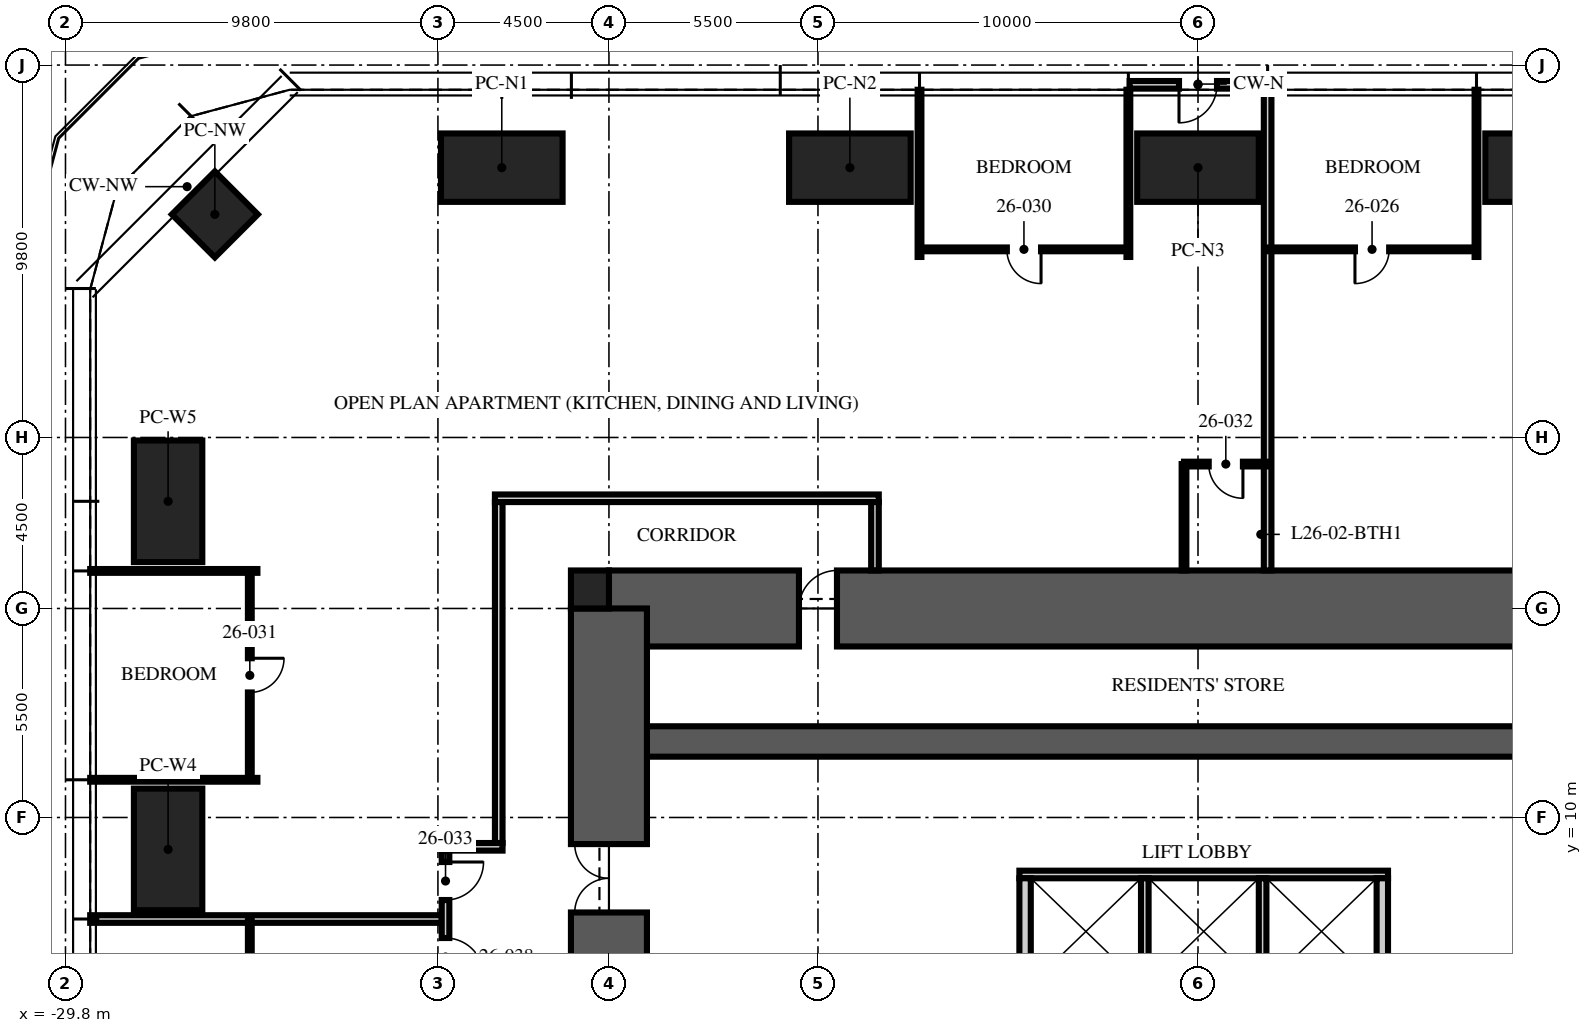
"""IFC4 building model, lengths in metres.
Left out: names, types, materials, properties, quantities, classifications, styles, units other than length and angle.
Written with IfcOpenShell. Run it as: python <this file> out.ifc"""

import sys

from ifc_helpers import new_model, si_unit, direction, frame, frame_2d, origin, origin_2d, place, context, subcontext, project, spatial, rectangle, hollow_rectangle, extrude, element, fill, save


model = new_model("IFC4")
c1 = context("Model", 3, precision=1e-05, world=origin(), true_north=direction((0.0, 1.0)))
c2 = subcontext(c1, "Body", "Model", "MODEL_VIEW")
j1 = project(units=[si_unit("LENGTHUNIT", "METRE"), si_unit("PLANEANGLEUNIT", "RADIAN")], contexts=[c1])
p1 = place(None, origin())
s1 = spatial("IfcSite", under=j1, at=p1, CompositionType="ELEMENT")
p2 = place(p1, origin())
s2 = spatial("IfcBuilding", under=s1, at=p2, CompositionType="ELEMENT")
p3 = place(p2, frame((0.0, 0.0, 107.25)))
s3 = spatial("IfcBuildingStorey", under=s2, at=p3, CompositionType="ELEMENT", Elevation=107.25)
p4 = place(p3, frame((-15.5, 15.5, -0.25), z_axis=(0.0, 0.0, 1.0), x_axis=(1.0, 0.0, 0.0)))
e1 = element("IfcWall", 1, at=p4, inside=s3, PredefinedType="SHEAR", context=c2, shape_type="SweptSolid", body=[
    extrude(rectangle(XDim=31.0, YDim=2.0, at=frame_2d((15.5, 0.0))), origin(), (0.0, 0.0, 1.0), 3.75),
])
p5 = place(p4, frame((5.0, 0.0, 0.25)))
e2 = element("IfcOpeningElement", 2, at=p5, cuts=e1, PredefinedType="OPENING", context=c2, shape_type="SweptSolid", body=[
    extrude(rectangle(XDim=1.0, YDim=2.1, at=frame_2d((0.5, 1.05))), frame((0.0, 1.01, 0.0), z_axis=(0.0, -1.0, 0.0), x_axis=(1.0, 0.0, 0.0)), (0.0, 0.0, 1.0), 2.02),
])
p6 = place(p3, frame((-15.5, 12.0, -0.25), z_axis=(0.0, 0.0, 1.0), x_axis=(1.0, 0.0, 0.0)))
e3 = element("IfcWall", 3, at=p6, inside=s3, PredefinedType="SHEAR", context=c2, shape_type="SweptSolid", body=[
    extrude(rectangle(XDim=31.0, YDim=0.8, at=frame_2d((15.5, 0.0))), origin(), (0.0, 0.0, 1.0), 3.75),
])
p7 = place(p3, frame((-15.5, -15.5, -0.25), z_axis=(0.0, 0.0, 1.0), x_axis=(0.0, 1.0, 0.0)))
e4 = element("IfcWall", 4, at=p7, inside=s3, PredefinedType="SHEAR", context=c2, shape_type="SweptSolid", body=[
    extrude(rectangle(XDim=31.0, YDim=2.0, at=frame_2d((15.5, 0.0))), origin(), (0.0, 0.0, 1.0), 3.75),
])
p8 = place(p7, frame((6.5, 0.0, 0.25)))
e5 = element("IfcOpeningElement", 5, at=p8, cuts=e4, PredefinedType="OPENING", context=c2, shape_type="SweptSolid", body=[
    extrude(rectangle(XDim=1.2, YDim=2.1, at=frame_2d((0.6, 1.05))), frame((0.0, 1.01, 0.0), z_axis=(0.0, -1.0, 0.0), x_axis=(1.0, 0.0, 0.0)), (0.0, 0.0, 1.0), 2.02),
])
p9 = place(p7, frame((23.0, 0.0, 0.25)))
e6 = element("IfcOpeningElement", 6, at=p9, cuts=e4, PredefinedType="OPENING", context=c2, shape_type="SweptSolid", body=[
    extrude(rectangle(XDim=1.8, YDim=2.1, at=frame_2d((0.9, 1.05))), frame((0.0, 1.01, 0.0), z_axis=(0.0, -1.0, 0.0), x_axis=(1.0, 0.0, 0.0)), (0.0, 0.0, 1.0), 2.02),
])
p10 = place(p3, frame((-16.0, 16.0, -0.25), z_axis=(0.0, 0.0, 1.0), x_axis=(1.0, 0.0, 0.0)))
e7 = element("IfcColumn", 7, at=p10, inside=s3, PredefinedType="COLUMN", context=c2, shape_type="SweptSolid", body=[
    extrude(rectangle(XDim=1.0, YDim=1.0, at=origin_2d()), origin(), (0.0, 0.0, 1.0), 3.75),
])
p11 = place(p3, frame((-18.32, 27.1, 0.08), z_axis=(0.0, 0.0, 1.0), x_axis=(1.0, 0.0, 0.0)))
e8 = element("IfcColumn", 8, at=p11, inside=s3, PredefinedType="COLUMN", context=c2, shape_type="SweptSolid", body=[
    extrude(hollow_rectangle(XDim=3.2, YDim=1.8, WallThickness=0.2, at=origin_2d()), origin(), (0.0, 0.0, 1.0), 3.67),
])
p12 = place(p3, frame((-9.16, 27.1, -0.07), z_axis=(0.0, 0.0, 1.0), x_axis=(1.0, 0.0, 0.0)))
e9 = element("IfcColumn", 9, at=p12, inside=s3, PredefinedType="COLUMN", context=c2, shape_type="SweptSolid", body=[
    extrude(hollow_rectangle(XDim=3.2, YDim=1.8, WallThickness=0.2, at=origin_2d()), origin(), (0.0, 0.0, 1.0), 3.82),
])
p13 = place(p3, frame((0.0, 27.1, -0.23), z_axis=(0.0, 0.0, 1.0), x_axis=(1.0, 0.0, 0.0)))
e10 = element("IfcColumn", 10, at=p13, inside=s3, PredefinedType="COLUMN", context=c2, shape_type="SweptSolid", body=[
    extrude(hollow_rectangle(XDim=3.2, YDim=1.8, WallThickness=0.2, at=origin_2d()), origin(), (0.0, 0.0, 1.0), 3.98),
])
for number, where, z_axis, x_axis in (
    (11, (9.16, 27.1, -0.07), (0.0, 0.0, 1.0), (1.0, 0.0, 0.0)),
    (12, (-27.1, 9.16, -0.07), (0.0, 0.0, 1.0), (0.0, 1.0, 0.0)),
):
    element("IfcColumn", number, at=place(p3, frame(where, z_axis=z_axis, x_axis=x_axis)), inside=s3, PredefinedType="COLUMN", context=c2, shape_type="SweptSolid", body=[
        extrude(hollow_rectangle(XDim=3.2, YDim=1.8, WallThickness=0.2, at=origin_2d()), origin(), (0.0, 0.0, 1.0), 3.82),
    ])
p14 = place(p3, frame((-27.1, 18.32, 0.08), z_axis=(0.0, 0.0, 1.0), x_axis=(0.0, 1.0, 0.0)))
e13 = element("IfcColumn", 13, at=p14, inside=s3, PredefinedType="COLUMN", context=c2, shape_type="SweptSolid", body=[
    extrude(hollow_rectangle(XDim=3.2, YDim=1.8, WallThickness=0.2, at=origin_2d()), origin(), (0.0, 0.0, 1.0), 3.67),
])
p15 = place(p3, frame((-25.87, 25.87, -0.19), z_axis=(0.0, 0.0, 1.0), x_axis=(0.707106781187, 0.707106781187, 0.0)))
e14 = element("IfcColumn", 14, at=p15, inside=s3, PredefinedType="COLUMN", context=c2, shape_type="SweptSolid", body=[
    extrude(hollow_rectangle(XDim=1.6, YDim=1.6, WallThickness=0.1, at=origin_2d()), origin(), (0.0, 0.0, 1.0), 3.94),
])
p16 = place(p3, frame((1.8, 29.28, 0.0), z_axis=(0.0, 0.0, 1.0), x_axis=(-1.0, 0.0, 0.0)))
e15 = element("IfcWall", 15, at=p16, inside=s3, PredefinedType="ELEMENTEDWALL", context=c2, shape_type="SweptSolid", body=[
    extrude(rectangle(XDim=3.599, YDim=0.2, at=frame_2d((1.8, 0.0))), origin(), (0.0, 0.0, 1.0), 3.75),
])
p17 = place(p16, frame((1.3, 0.0, 0.0)))
e16 = element("IfcOpeningElement", 16, at=p17, cuts=e15, PredefinedType="OPENING", context=c2, shape_type="SweptSolid", body=[
    extrude(rectangle(XDim=1.0, YDim=2.4, at=frame_2d((0.5, 1.2))), frame((0.0, 0.11, 0.0), z_axis=(0.0, -1.0, 0.0), x_axis=(1.0, 0.0, 0.0)), (0.0, 0.0, 1.0), 0.22),
])
p18 = place(p3, frame((-4.7, 8.5, 0.0), z_axis=(0.0, 0.0, 1.0), x_axis=(1.0, 0.0, 0.0)))
e17 = element("IfcWall", 17, at=p18, inside=s3, PredefinedType="PARTITIONING", context=c2, shape_type="SweptSolid", body=[
    extrude(rectangle(XDim=9.7, YDim=0.2, at=frame_2d((4.85, 0.0))), origin(), (0.0, 0.0, 1.0), 3.5),
])
for number, where, z_axis, x_axis in (
    (18, (-4.55, 5.6, 0.0), (0.0, 0.0, 1.0), (0.0, 1.0, 0.0)),
    (19, (4.85, 5.6, 0.0), (0.0, 0.0, 1.0), (0.0, 1.0, 0.0)),
):
    element("IfcWall", number, at=place(p3, frame(where, z_axis=z_axis, x_axis=x_axis)), inside=s3, PredefinedType="PARTITIONING", context=c2, shape_type="SweptSolid", body=[
        extrude(rectangle(XDim=2.8, YDim=0.3, at=frame_2d((1.4, 0.0))), origin(), (0.0, 0.0, 1.0), 3.5),
    ])
for number, where, z_axis, x_axis in (
    (20, (-1.4, 5.6, 0.0), (0.0, 0.0, 1.0), (0.0, 1.0, 0.0)),
    (21, (1.7, 5.6, 0.0), (0.0, 0.0, 1.0), (0.0, 1.0, 0.0)),
):
    element("IfcWall", number, at=place(p3, frame(where, z_axis=z_axis, x_axis=x_axis)), inside=s3, PredefinedType="PARTITIONING", context=c2, shape_type="SweptSolid", body=[
        extrude(rectangle(XDim=2.8, YDim=0.2, at=frame_2d((1.4, 0.0))), origin(), (0.0, 0.0, 1.0), 3.5),
    ])
p19 = place(p3, frame((-18.5, 18.4, 0.0), z_axis=(0.0, 0.0, 1.0), x_axis=(1.0, 0.0, 0.0)))
e22 = element("IfcWall", 22, at=p19, inside=s3, PredefinedType="PARTITIONING", context=c2, shape_type="SweptSolid", body=[
    extrude(rectangle(XDim=10.1, YDim=0.2, at=frame_2d((5.05, 0.0))), origin(), (0.0, 0.0, 1.0), 2.3),
])
p20 = place(p3, frame((-8.5, 18.3, 0.0), z_axis=(0.0, 0.0, 1.0), x_axis=(0.0, -1.0, 0.0)))
e23 = element("IfcWall", 23, at=p20, inside=s3, PredefinedType="PARTITIONING", context=c2, shape_type="SweptSolid", body=[
    extrude(rectangle(XDim=1.8, YDim=0.2, at=frame_2d((0.9, 0.0))), origin(), (0.0, 0.0, 1.0), 3.5),
])
p21 = place(p3, frame((7.328, 24.75, 0.0), z_axis=(0.0, 0.0, 1.0), x_axis=(0.0, 1.0, 0.0)))
e24 = element("IfcWall", 24, at=p21, inside=s3, PredefinedType="PARTITIONING", context=c2, shape_type="SweptSolid", body=[
    extrude(rectangle(XDim=4.4, YDim=0.1, at=frame_2d((2.2, 0.0))), origin(), (0.0, 0.0, 1.0), 2.81),
])
p22 = place(p3, frame((1.832, 16.5, 0.0), z_axis=(0.0, 0.0, 1.0), x_axis=(0.0, 1.0, 0.0)))
e25 = element("IfcWall", 25, at=p22, inside=s3, PredefinedType="PARTITIONING", context=c2, shape_type="SweptSolid", body=[
    extrude(rectangle(XDim=12.65, YDim=0.2, at=frame_2d((6.325, 0.0))), origin(), (0.0, 0.0, 1.0), 2.81),
])
for number, where, z_axis, x_axis in (
    (26, (-1.832, 24.75, 0.0), (0.0, 0.0, 1.0), (0.0, 1.0, 0.0)),
    (27, (-7.328, 24.75, 0.0), (0.0, 0.0, 1.0), (0.0, 1.0, 0.0)),
    (28, (-24.75, 16.488, 0.0), (0.0, 0.0, 1.0), (-1.0, 0.0, 0.0)),
    (29, (-24.75, 10.992, 0.0), (0.0, 0.0, 1.0), (-1.0, 0.0, 0.0)),
):
    element("IfcWall", number, at=place(p3, frame(where, z_axis=z_axis, x_axis=x_axis)), inside=s3, PredefinedType="PARTITIONING", context=c2, shape_type="SweptSolid", body=[
        extrude(rectangle(XDim=4.4, YDim=0.1, at=frame_2d((2.2, 0.0))), origin(), (0.0, 0.0, 1.0), 2.81),
    ])
p23 = place(p3, frame((-19.9, 7.328, 0.0), z_axis=(0.0, 0.0, 1.0), x_axis=(-1.0, 0.0, 0.0)))
e30 = element("IfcWall", 30, at=p23, inside=s3, PredefinedType="PARTITIONING", context=c2, shape_type="SweptSolid", body=[
    extrude(rectangle(XDim=9.25, YDim=0.2, at=frame_2d((4.625, 0.0))), origin(), (0.0, 0.0, 1.0), 2.81),
])
p24 = place(p3, frame((7.328, 24.95, 0.0), z_axis=(0.0, 0.0, 1.0), x_axis=(-1.0, 0.0, 0.0)))
e31 = element("IfcWall", 31, at=p24, inside=s3, PredefinedType="PARTITIONING", context=c2, shape_type="SweptSolid", body=[
    extrude(rectangle(XDim=5.496, YDim=0.1, at=frame_2d((2.748, 0.0))), origin(), (0.0, 0.0, 1.0), 2.81),
])
p25 = place(p24, frame((2.298, 0.0, 0.0)))
e32 = element("IfcOpeningElement", 32, at=p25, cuts=e31, PredefinedType="OPENING", context=c2, shape_type="SweptSolid", body=[
    extrude(rectangle(XDim=0.9, YDim=2.1, at=frame_2d((0.45, 1.05))), frame((0.0, 0.06, 0.0), z_axis=(0.0, -1.0, 0.0), x_axis=(1.0, 0.0, 0.0)), (0.0, 0.0, 1.0), 0.12),
])
p26 = place(p3, frame((-1.832, 24.95, 0.0), z_axis=(0.0, 0.0, 1.0), x_axis=(-1.0, 0.0, 0.0)))
e33 = element("IfcWall", 33, at=p26, inside=s3, PredefinedType="PARTITIONING", context=c2, shape_type="SweptSolid", body=[
    extrude(rectangle(XDim=5.496, YDim=0.1, at=frame_2d((2.748, 0.0))), origin(), (0.0, 0.0, 1.0), 2.81),
])
p27 = place(p26, frame((2.298, 0.0, 0.0)))
e34 = element("IfcOpeningElement", 34, at=p27, cuts=e33, PredefinedType="OPENING", context=c2, shape_type="SweptSolid", body=[
    extrude(rectangle(XDim=0.9, YDim=2.1, at=frame_2d((0.45, 1.05))), frame((0.0, 0.06, 0.0), z_axis=(0.0, -1.0, 0.0), x_axis=(1.0, 0.0, 0.0)), (0.0, 0.0, 1.0), 0.12),
])
p28 = place(p3, frame((-24.95, 16.488, 0.0), z_axis=(0.0, 0.0, 1.0), x_axis=(0.0, -1.0, 0.0)))
e35 = element("IfcWall", 35, at=p28, inside=s3, PredefinedType="PARTITIONING", context=c2, shape_type="SweptSolid", body=[
    extrude(rectangle(XDim=5.496, YDim=0.1, at=frame_2d((2.748, 0.0))), origin(), (0.0, 0.0, 1.0), 2.81),
])
p29 = place(p28, frame((2.298, 0.0, 0.0)))
e36 = element("IfcOpeningElement", 36, at=p29, cuts=e35, PredefinedType="OPENING", context=c2, shape_type="SweptSolid", body=[
    extrude(rectangle(XDim=0.9, YDim=2.1, at=frame_2d((0.45, 1.05))), frame((0.0, 0.06, 0.0), z_axis=(0.0, -1.0, 0.0), x_axis=(1.0, 0.0, 0.0)), (0.0, 0.0, 1.0), 0.12),
])
p30 = place(p3, frame((1.832, 19.3, 0.0), z_axis=(0.0, 0.0, 1.0), x_axis=(-1.0, 0.0, 0.0)))
e37 = element("IfcWall", 37, at=p30, inside=s3, PredefinedType="PARTITIONING", context=c2, shape_type="SweptSolid", body=[
    extrude(rectangle(XDim=2.2, YDim=0.125, at=frame_2d((1.1, 0.0))), origin(), (0.0, 0.0, 1.0), 2.7),
])
p31 = place(p30, frame((0.65, 0.0, 0.0)))
e38 = element("IfcOpeningElement", 38, at=p31, cuts=e37, PredefinedType="OPENING", context=c2, shape_type="SweptSolid", body=[
    extrude(rectangle(XDim=0.9, YDim=2.1, at=frame_2d((0.45, 1.05))), frame((0.0, 0.073, 0.0), z_axis=(0.0, -1.0, 0.0), x_axis=(1.0, 0.0, 0.0)), (0.0, 0.0, 1.0), 0.145),
])
p32 = place(p3, frame((-0.368, 16.5, 0.0), z_axis=(0.0, 0.0, 1.0), x_axis=(0.0, 1.0, 0.0)))
e39 = element("IfcWall", 39, at=p32, inside=s3, PredefinedType="PARTITIONING", context=c2, shape_type="SweptSolid", body=[
    extrude(rectangle(XDim=2.8, YDim=0.125, at=frame_2d((1.4, 0.0))), origin(), (0.0, 0.0, 1.0), 3.5),
])
p33 = place(p3, frame((-24.95, 7.328, 0.0), z_axis=(0.0, 0.0, 1.0), x_axis=(0.0, -1.0, 0.0)))
e40 = element("IfcWall", 40, at=p33, inside=s3, PredefinedType="PARTITIONING", context=c2, shape_type="SweptSolid", body=[
    extrude(rectangle(XDim=5.496, YDim=0.1, at=frame_2d((2.748, 0.0))), origin(), (0.0, 0.0, 1.0), 2.81),
])
p34 = place(p33, frame((2.298, 0.0, 0.0)))
e41 = element("IfcOpeningElement", 41, at=p34, cuts=e40, PredefinedType="OPENING", context=c2, shape_type="SweptSolid", body=[
    extrude(rectangle(XDim=0.9, YDim=2.1, at=frame_2d((0.45, 1.05))), frame((0.0, 0.06, 0.0), z_axis=(0.0, -1.0, 0.0), x_axis=(1.0, 0.0, 0.0)), (0.0, 0.0, 1.0), 0.12),
])
p35 = place(p3, frame((-18.4, 18.3, 0.0), z_axis=(0.0, 0.0, 1.0), x_axis=(0.0, -1.0, 0.0)))
e42 = element("IfcWall", 42, at=p35, inside=s3, PredefinedType="PARTITIONING", context=c2, shape_type="SweptSolid", body=[
    extrude(rectangle(XDim=8.972, YDim=0.2, at=frame_2d((4.486, 0.0))), origin(), (0.0, 0.0, 1.0), 2.3),
])
p36 = place(p3, frame((-18.3, 9.228, 0.0), z_axis=(0.0, 0.0, 1.0), x_axis=(-1.0, 0.0, 0.0)))
e43 = element("IfcWall", 43, at=p36, inside=s3, PredefinedType="PARTITIONING", context=c2, shape_type="SweptSolid", body=[
    extrude(rectangle(XDim=1.6, YDim=0.2, at=frame_2d((0.8, 0.0))), origin(), (0.0, 0.0, 1.0), 2.7),
])
p37 = place(p3, frame((-19.8, 9.128, 0.0), z_axis=(0.0, 0.0, 1.0), x_axis=(0.0, -1.0, 0.0)))
e44 = element("IfcWall", 44, at=p37, inside=s3, PredefinedType="PARTITIONING", context=c2, shape_type="SweptSolid", body=[
    extrude(rectangle(XDim=3.6, YDim=0.2, at=frame_2d((1.8, 0.0))), origin(), (0.0, 0.0, 1.0), 2.7),
])
p38 = place(p37, frame((0.3, 0.0, 0.0)))
e45 = element("IfcOpeningElement", 45, at=p38, cuts=e44, PredefinedType="OPENING", context=c2, shape_type="SweptSolid", body=[
    extrude(rectangle(XDim=1.0, YDim=2.2, at=frame_2d((0.5, 1.1))), frame((0.0, 0.11, 0.0), z_axis=(0.0, -1.0, 0.0), x_axis=(1.0, 0.0, 0.0)), (0.0, 0.0, 1.0), 0.22),
])
p39 = place(p37, frame((2.3, 0.0, 0.0)))
e46 = element("IfcOpeningElement", 46, at=p39, cuts=e44, PredefinedType="OPENING", context=c2, shape_type="SweptSolid", body=[
    extrude(rectangle(XDim=1.0, YDim=2.2, at=frame_2d((0.5, 1.1))), frame((0.0, 0.11, 0.0), z_axis=(0.0, -1.0, 0.0), x_axis=(1.0, 0.0, 0.0)), (0.0, 0.0, 1.0), 0.22),
])
p40 = place(p17, origin())
e47 = element("IfcDoor", 47, at=p40, inside=s3, OperationType="SINGLE_SWING_LEFT", PredefinedType="DOOR", context=c2, shape_type="SweptSolid", body=[
    extrude(rectangle(XDim=1.0, YDim=2.4, at=frame_2d((0.5, 1.2))), frame((0.0, 0.025, 0.0), z_axis=(0.0, -1.0, 0.0), x_axis=(1.0, 0.0, 0.0)), (0.0, 0.0, 1.0), 0.05),
])
fill(e16, e47)
p41 = place(p9, origin())
e48 = element("IfcDoor", 48, at=p41, inside=s3, OperationType="DOUBLE_DOOR_SINGLE_SWING", PredefinedType="DOOR", context=c2, shape_type="SweptSolid", body=[
    extrude(rectangle(XDim=1.8, YDim=2.1, at=frame_2d((0.9, 1.05))), frame((0.0, 0.025, 0.0), z_axis=(0.0, -1.0, 0.0), x_axis=(1.0, 0.0, 0.0)), (0.0, 0.0, 1.0), 0.05),
])
fill(e6, e48)
p42 = place(p5, origin())
e49 = element("IfcDoor", 49, at=p42, inside=s3, OperationType="SINGLE_SWING_RIGHT", PredefinedType="DOOR", context=c2, shape_type="SweptSolid", body=[
    extrude(rectangle(XDim=1.0, YDim=2.1, at=frame_2d((0.5, 1.05))), frame((0.0, 0.025, 0.0), z_axis=(0.0, -1.0, 0.0), x_axis=(1.0, 0.0, 0.0)), (0.0, 0.0, 1.0), 0.05),
])
fill(e2, e49)
p43 = place(p25, origin())
e50 = element("IfcDoor", 50, at=p43, inside=s3, OperationType="SINGLE_SWING_RIGHT", PredefinedType="DOOR", context=c2, shape_type="SweptSolid", body=[
    extrude(rectangle(XDim=0.9, YDim=2.1, at=frame_2d((0.45, 1.05))), frame((0.0, 0.025, 0.0), z_axis=(0.0, -1.0, 0.0), x_axis=(1.0, 0.0, 0.0)), (0.0, 0.0, 1.0), 0.05),
])
fill(e32, e50)
p44 = place(p27, origin())
e51 = element("IfcDoor", 51, at=p44, inside=s3, OperationType="SINGLE_SWING_LEFT", PredefinedType="DOOR", context=c2, shape_type="SweptSolid", body=[
    extrude(rectangle(XDim=0.9, YDim=2.1, at=frame_2d((0.45, 1.05))), frame((0.0, 0.025, 0.0), z_axis=(0.0, -1.0, 0.0), x_axis=(1.0, 0.0, 0.0)), (0.0, 0.0, 1.0), 0.05),
])
fill(e34, e51)
p45 = place(p29, origin())
e52 = element("IfcDoor", 52, at=p45, inside=s3, OperationType="SINGLE_SWING_LEFT", PredefinedType="DOOR", context=c2, shape_type="SweptSolid", body=[
    extrude(rectangle(XDim=0.9, YDim=2.1, at=frame_2d((0.45, 1.05))), frame((0.0, 0.025, 0.0), z_axis=(0.0, -1.0, 0.0), x_axis=(1.0, 0.0, 0.0)), (0.0, 0.0, 1.0), 0.05),
])
fill(e36, e52)
p46 = place(p31, origin())
e53 = element("IfcDoor", 53, at=p46, inside=s3, OperationType="SINGLE_SWING_LEFT", PredefinedType="DOOR", context=c2, shape_type="SweptSolid", body=[
    extrude(rectangle(XDim=0.9, YDim=2.1, at=frame_2d((0.45, 1.05))), frame((0.0, 0.025, 0.0), z_axis=(0.0, -1.0, 0.0), x_axis=(1.0, 0.0, 0.0)), (0.0, 0.0, 1.0), 0.05),
])
fill(e38, e53)
p47 = place(p38, origin())
e54 = element("IfcDoor", 54, at=p47, inside=s3, OperationType="SINGLE_SWING_LEFT", PredefinedType="DOOR", context=c2, shape_type="SweptSolid", body=[
    extrude(rectangle(XDim=1.0, YDim=2.2, at=frame_2d((0.5, 1.1))), frame((0.0, 0.025, 0.0), z_axis=(0.0, -1.0, 0.0), x_axis=(1.0, 0.0, 0.0)), (0.0, 0.0, 1.0), 0.05),
])
fill(e45, e54)
p48 = place(p39, origin())
e55 = element("IfcDoor", 55, at=p48, inside=s3, OperationType="SINGLE_SWING_RIGHT", PredefinedType="DOOR", context=c2, shape_type="SweptSolid", body=[
    extrude(rectangle(XDim=1.0, YDim=2.2, at=frame_2d((0.5, 1.1))), frame((0.0, 0.025, 0.0), z_axis=(0.0, -1.0, 0.0), x_axis=(1.0, 0.0, 0.0)), (0.0, 0.0, 1.0), 0.05),
])
fill(e46, e55)
save(model, sys.argv[1])
